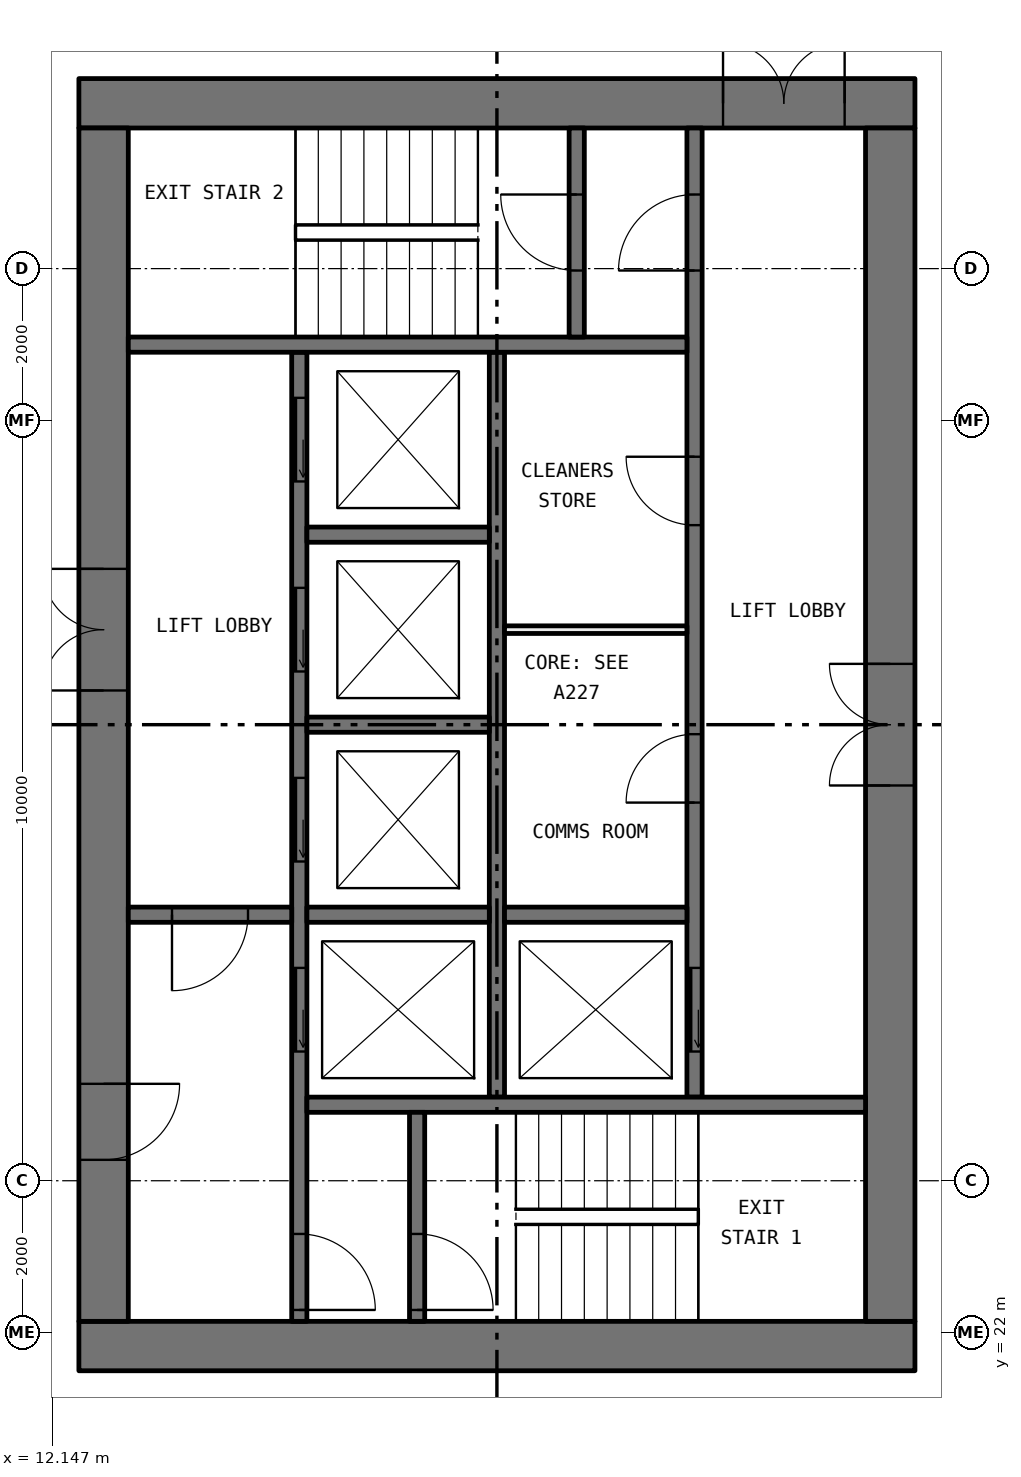
"""IFC4 building model, lengths in metres.
Left out: names, types, materials, properties, quantities, classifications, styles, units other than length and angle.
Written with IfcOpenShell. Run it as: python <this file> out.ifc"""

import sys

from ifc_helpers import new_model, si_unit, direction, frame, frame_2d, origin, place, context, subcontext, project, spatial, rectangle, extrude, element, fill, save


model = new_model("IFC4")
c1 = context("Model", 3, precision=1e-05, world=origin(), true_north=direction((0.0, 1.0)))
c2 = subcontext(c1, "Body", "Model", "MODEL_VIEW")
j1 = project(units=[si_unit("LENGTHUNIT", "METRE"), si_unit("PLANEANGLEUNIT", "RADIAN")], contexts=[c1])
p1 = place(None, origin())
s1 = spatial("IfcSite", under=j1, at=p1, CompositionType="ELEMENT")
p2 = place(p1, origin())
s2 = spatial("IfcBuilding", under=s1, at=p2, CompositionType="ELEMENT")
p3 = place(p2, frame((0.0, 0.0, 103.5)))
s3 = spatial("IfcBuildingStorey", under=s2, at=p3, CompositionType="ELEMENT", Elevation=103.5)
p4 = place(p3, frame((12.5, 21.825, 0.0), z_axis=(0.0, 0.0, 1.0), x_axis=(1.0, 0.0, 0.0)))
e1 = element("IfcWall", 1, at=p4, inside=s3, PredefinedType="SHEAR", context=c2, shape_type="SweptSolid", body=[
    extrude(rectangle(XDim=11.0, YDim=0.65, at=frame_2d((5.5, 0.0))), origin(), (0.0, 0.0, 1.0), 3.05),
])
p5 = place(p3, frame((12.5, 38.175, 0.0), z_axis=(0.0, 0.0, 1.0), x_axis=(1.0, 0.0, 0.0)))
e2 = element("IfcWall", 2, at=p5, inside=s3, PredefinedType="SHEAR", context=c2, shape_type="SweptSolid", body=[
    extrude(rectangle(XDim=11.0, YDim=0.65, at=frame_2d((5.5, 0.0))), origin(), (0.0, 0.0, 1.0), 3.05),
])
p6 = place(p5, frame((8.475, 0.0, 0.0)))
e3 = element("IfcOpeningElement", 3, at=p6, cuts=e2, PredefinedType="OPENING", context=c2, shape_type="SweptSolid", body=[
    extrude(rectangle(XDim=1.6, YDim=2.1, at=frame_2d((0.8, 1.05))), frame((0.0, 0.335, 0.0), z_axis=(0.0, -1.0, 0.0), x_axis=(1.0, 0.0, 0.0)), (0.0, 0.0, 1.0), 0.67),
])
p7 = place(p3, frame((12.825, 22.15, 0.0), z_axis=(0.0, 0.0, 1.0), x_axis=(0.0, 1.0, 0.0)))
e4 = element("IfcWall", 4, at=p7, inside=s3, PredefinedType="SHEAR", context=c2, shape_type="SweptSolid", body=[
    extrude(rectangle(XDim=15.7, YDim=0.65, at=frame_2d((7.85, 0.0))), origin(), (0.0, 0.0, 1.0), 3.05),
])
p8 = place(p7, frame((8.3, 0.0, 0.0)))
e5 = element("IfcOpeningElement", 5, at=p8, cuts=e4, PredefinedType="OPENING", context=c2, shape_type="SweptSolid", body=[
    extrude(rectangle(XDim=1.6, YDim=2.1, at=frame_2d((0.8, 1.05))), frame((0.0, 0.335, 0.0), z_axis=(0.0, -1.0, 0.0), x_axis=(1.0, 0.0, 0.0)), (0.0, 0.0, 1.0), 0.67),
])
p9 = place(p7, frame((2.125, 0.0, 0.0)))
e6 = element("IfcOpeningElement", 6, at=p9, cuts=e4, PredefinedType="OPENING", context=c2, shape_type="SweptSolid", body=[
    extrude(rectangle(XDim=1.0, YDim=2.1, at=frame_2d((0.5, 1.05))), frame((0.0, 0.335, 0.0), z_axis=(0.0, -1.0, 0.0), x_axis=(1.0, 0.0, 0.0)), (0.0, 0.0, 1.0), 0.67),
])
p10 = place(p3, frame((23.175, 22.15, 0.0), z_axis=(0.0, 0.0, 1.0), x_axis=(0.0, 1.0, 0.0)))
e7 = element("IfcWall", 7, at=p10, inside=s3, PredefinedType="SHEAR", context=c2, shape_type="SweptSolid", body=[
    extrude(rectangle(XDim=15.7, YDim=0.65, at=frame_2d((7.85, 0.0))), origin(), (0.0, 0.0, 1.0), 3.05),
])
p11 = place(p10, frame((7.05, 0.0, 0.0)))
e8 = element("IfcOpeningElement", 8, at=p11, cuts=e7, PredefinedType="OPENING", context=c2, shape_type="SweptSolid", body=[
    extrude(rectangle(XDim=1.6, YDim=2.1, at=frame_2d((0.8, 1.05))), frame((0.0, 0.335, 0.0), z_axis=(0.0, -1.0, 0.0), x_axis=(1.0, 0.0, 0.0)), (0.0, 0.0, 1.0), 0.67),
])
p12 = place(p3, frame((15.4, 22.15, 0.0), z_axis=(0.0, 0.0, 1.0), x_axis=(0.0, 1.0, 0.0)))
e9 = element("IfcWall", 9, at=p12, inside=s3, PredefinedType="SOLIDWALL", context=c2, shape_type="SweptSolid", body=[
    extrude(rectangle(XDim=12.75, YDim=0.2, at=frame_2d((6.375, 0.0))), origin(), (0.0, 0.0, 1.0), 3.05),
])
p13 = place(p12, frame((3.55, 0.0, 0.0)))
e10 = element("IfcOpeningElement", 10, at=p13, cuts=e9, PredefinedType="OPENING", context=c2, shape_type="SweptSolid", body=[
    extrude(rectangle(XDim=1.1, YDim=2.1, at=frame_2d((0.55, 1.05))), frame((0.0, 0.11, 0.0), z_axis=(0.0, -1.0, 0.0), x_axis=(1.0, 0.0, 0.0)), (0.0, 0.0, 1.0), 0.22),
])
p14 = place(p12, frame((6.05, 0.0, 0.0)))
e11 = element("IfcOpeningElement", 11, at=p14, cuts=e9, PredefinedType="OPENING", context=c2, shape_type="SweptSolid", body=[
    extrude(rectangle(XDim=1.1, YDim=2.1, at=frame_2d((0.55, 1.05))), frame((0.0, 0.11, 0.0), z_axis=(0.0, -1.0, 0.0), x_axis=(1.0, 0.0, 0.0)), (0.0, 0.0, 1.0), 0.22),
])
p15 = place(p12, frame((8.55, 0.0, 0.0)))
e12 = element("IfcOpeningElement", 12, at=p15, cuts=e9, PredefinedType="OPENING", context=c2, shape_type="SweptSolid", body=[
    extrude(rectangle(XDim=1.1, YDim=2.1, at=frame_2d((0.55, 1.05))), frame((0.0, 0.11, 0.0), z_axis=(0.0, -1.0, 0.0), x_axis=(1.0, 0.0, 0.0)), (0.0, 0.0, 1.0), 0.22),
])
p16 = place(p12, frame((11.05, 0.0, 0.0)))
e13 = element("IfcOpeningElement", 13, at=p16, cuts=e9, PredefinedType="OPENING", context=c2, shape_type="SweptSolid", body=[
    extrude(rectangle(XDim=1.1, YDim=2.1, at=frame_2d((0.55, 1.05))), frame((0.0, 0.11, 0.0), z_axis=(0.0, -1.0, 0.0), x_axis=(1.0, 0.0, 0.0)), (0.0, 0.0, 1.0), 0.22),
])
p17 = place(p12, frame((0.15, 0.0, 0.0)))
e14 = element("IfcOpeningElement", 14, at=p17, cuts=e9, PredefinedType="OPENING", context=c2, shape_type="SweptSolid", body=[
    extrude(rectangle(XDim=1.0, YDim=2.1, at=frame_2d((0.5, 1.05))), frame((0.0, 0.11, 0.0), z_axis=(0.0, -1.0, 0.0), x_axis=(1.0, 0.0, 0.0)), (0.0, 0.0, 1.0), 0.22),
])
p18 = place(p3, frame((20.6, 25.1, 0.0), z_axis=(0.0, 0.0, 1.0), x_axis=(0.0, 1.0, 0.0)))
e15 = element("IfcWall", 15, at=p18, inside=s3, PredefinedType="SOLIDWALL", context=c2, shape_type="SweptSolid", body=[
    extrude(rectangle(XDim=12.75, YDim=0.2, at=frame_2d((6.375, 0.0))), origin(), (0.0, 0.0, 1.0), 3.05),
])
p19 = place(p18, frame((0.6, 0.0, 0.0)))
e16 = element("IfcOpeningElement", 16, at=p19, cuts=e15, PredefinedType="OPENING", context=c2, shape_type="SweptSolid", body=[
    extrude(rectangle(XDim=1.1, YDim=2.1, at=frame_2d((0.55, 1.05))), frame((0.0, 0.11, 0.0), z_axis=(0.0, -1.0, 0.0), x_axis=(1.0, 0.0, 0.0)), (0.0, 0.0, 1.0), 0.22),
])
p20 = place(p18, frame((10.875, 0.0, 0.0)))
e17 = element("IfcOpeningElement", 17, at=p20, cuts=e15, PredefinedType="OPENING", context=c2, shape_type="SweptSolid", body=[
    extrude(rectangle(XDim=1.0, YDim=2.1, at=frame_2d((0.5, 1.05))), frame((0.0, 0.11, 0.0), z_axis=(0.0, -1.0, 0.0), x_axis=(1.0, 0.0, 0.0)), (0.0, 0.0, 1.0), 0.22),
])
p21 = place(p18, frame((3.875, 0.0, 0.0)))
e18 = element("IfcOpeningElement", 18, at=p21, cuts=e15, PredefinedType="OPENING", context=c2, shape_type="SweptSolid", body=[
    extrude(rectangle(XDim=0.9, YDim=2.1, at=frame_2d((0.45, 1.05))), frame((0.0, 0.11, 0.0), z_axis=(0.0, -1.0, 0.0), x_axis=(1.0, 0.0, 0.0)), (0.0, 0.0, 1.0), 0.22),
])
p22 = place(p18, frame((7.525, 0.0, 0.0)))
e19 = element("IfcOpeningElement", 19, at=p22, cuts=e15, PredefinedType="OPENING", context=c2, shape_type="SweptSolid", body=[
    extrude(rectangle(XDim=0.9, YDim=2.1, at=frame_2d((0.45, 1.05))), frame((0.0, 0.11, 0.0), z_axis=(0.0, -1.0, 0.0), x_axis=(1.0, 0.0, 0.0)), (0.0, 0.0, 1.0), 0.22),
])
p23 = place(p3, frame((18.0, 25.1, 0.0), z_axis=(0.0, 0.0, 1.0), x_axis=(0.0, 1.0, 0.0)))
e20 = element("IfcWall", 20, at=p23, inside=s3, PredefinedType="SOLIDWALL", context=c2, shape_type="SweptSolid", body=[
    extrude(rectangle(XDim=9.8, YDim=0.2, at=frame_2d((4.9, 0.0))), origin(), (0.0, 0.0, 1.0), 3.05),
])
for number, where, z_axis, x_axis in (
    (21, (15.5, 25.0, 0.0), (0.0, 0.0, 1.0), (1.0, 0.0, 0.0)),
    (22, (13.15, 35.0, 0.0), (0.0, 0.0, 1.0), (1.0, 0.0, 0.0)),
):
    element("IfcWall", number, at=place(p3, frame(where, z_axis=z_axis, x_axis=x_axis)), inside=s3, PredefinedType="SOLIDWALL", context=c2, shape_type="SweptSolid", body=[
        extrude(rectangle(XDim=7.35, YDim=0.2, at=frame_2d((3.675, 0.0))), origin(), (0.0, 0.0, 1.0), 3.05),
    ])
p24 = place(p3, frame((13.15, 27.5, 0.0), z_axis=(0.0, 0.0, 1.0), x_axis=(1.0, 0.0, 0.0)))
e23 = element("IfcWall", 23, at=p24, inside=s3, PredefinedType="SOLIDWALL", context=c2, shape_type="SweptSolid", body=[
    extrude(rectangle(XDim=2.15, YDim=0.2, at=frame_2d((1.075, 0.0))), origin(), (0.0, 0.0, 1.0), 3.05),
])
p25 = place(p24, frame((0.575, 0.0, 0.0)))
e24 = element("IfcOpeningElement", 24, at=p25, cuts=e23, PredefinedType="OPENING", context=c2, shape_type="SweptSolid", body=[
    extrude(rectangle(XDim=1.0, YDim=2.1, at=frame_2d((0.5, 1.05))), frame((0.0, 0.11, 0.0), z_axis=(0.0, -1.0, 0.0), x_axis=(1.0, 0.0, 0.0)), (0.0, 0.0, 1.0), 0.22),
])
p26 = place(p3, frame((16.95, 22.15, 0.0), z_axis=(0.0, 0.0, 1.0), x_axis=(0.0, 1.0, 0.0)))
e25 = element("IfcWall", 25, at=p26, inside=s3, PredefinedType="SOLIDWALL", context=c2, shape_type="SweptSolid", body=[
    extrude(rectangle(XDim=2.75, YDim=0.2, at=frame_2d((1.375, 0.0))), origin(), (0.0, 0.0, 1.0), 3.05),
])
p27 = place(p26, frame((0.15, 0.0, 0.0)))
e26 = element("IfcOpeningElement", 26, at=p27, cuts=e25, PredefinedType="OPENING", context=c2, shape_type="SweptSolid", body=[
    extrude(rectangle(XDim=1.0, YDim=2.1, at=frame_2d((0.5, 1.05))), frame((0.0, 0.11, 0.0), z_axis=(0.0, -1.0, 0.0), x_axis=(1.0, 0.0, 0.0)), (0.0, 0.0, 1.0), 0.22),
])
p28 = place(p3, frame((19.05, 35.1, 0.0), z_axis=(0.0, 0.0, 1.0), x_axis=(0.0, 1.0, 0.0)))
e27 = element("IfcWall", 27, at=p28, inside=s3, PredefinedType="SOLIDWALL", context=c2, shape_type="SweptSolid", body=[
    extrude(rectangle(XDim=2.75, YDim=0.2, at=frame_2d((1.375, 0.0))), origin(), (0.0, 0.0, 1.0), 3.05),
])
p29 = place(p28, frame((0.875, 0.0, 0.0)))
e28 = element("IfcOpeningElement", 28, at=p29, cuts=e27, PredefinedType="OPENING", context=c2, shape_type="SweptSolid", body=[
    extrude(rectangle(XDim=1.0, YDim=2.1, at=frame_2d((0.5, 1.05))), frame((0.0, 0.11, 0.0), z_axis=(0.0, -1.0, 0.0), x_axis=(1.0, 0.0, 0.0)), (0.0, 0.0, 1.0), 0.22),
])
for number, where, z_axis, x_axis in (
    (29, (15.5, 27.5, 0.0), (0.0, 0.0, 1.0), (1.0, 0.0, 0.0)),
    (30, (15.5, 30.0, 0.0), (0.0, 0.0, 1.0), (1.0, 0.0, 0.0)),
    (31, (15.5, 32.5, 0.0), (0.0, 0.0, 1.0), (1.0, 0.0, 0.0)),
    (32, (18.1, 27.5, 0.0), (0.0, 0.0, 1.0), (1.0, 0.0, 0.0)),
):
    element("IfcWall", number, at=place(p3, frame(where, z_axis=z_axis, x_axis=x_axis)), inside=s3, PredefinedType="SOLIDWALL", context=c2, shape_type="SweptSolid", body=[
        extrude(rectangle(XDim=2.4, YDim=0.2, at=frame_2d((1.2, 0.0))), origin(), (0.0, 0.0, 1.0), 3.05),
    ])
p30 = place(p3, frame((18.1, 31.25, 0.0), z_axis=(0.0, 0.0, 1.0), x_axis=(1.0, 0.0, 0.0)))
e33 = element("IfcWall", 33, at=p30, inside=s3, PredefinedType="PARTITIONING", context=c2, shape_type="SweptSolid", body=[
    extrude(rectangle(XDim=2.4, YDim=0.1, at=frame_2d((1.2, 0.0))), origin(), (0.0, 0.0, 1.0), 3.05),
])
p31 = place(p19, origin())
e34 = element("IfcDoor", 34, at=p31, inside=s3, OperationType="SLIDING_TO_LEFT", PredefinedType="DOOR", context=c2, shape_type="SweptSolid", body=[
    extrude(rectangle(XDim=1.1, YDim=2.1, at=frame_2d((0.55, 1.05))), frame((0.0, 0.025, 0.0), z_axis=(0.0, -1.0, 0.0), x_axis=(1.0, 0.0, 0.0)), (0.0, 0.0, 1.0), 0.05),
])
fill(e16, e34)
p32 = place(p13, origin())
e35 = element("IfcDoor", 35, at=p32, inside=s3, OperationType="SLIDING_TO_LEFT", PredefinedType="DOOR", context=c2, shape_type="SweptSolid", body=[
    extrude(rectangle(XDim=1.1, YDim=2.1, at=frame_2d((0.55, 1.05))), frame((0.0, 0.025, 0.0), z_axis=(0.0, -1.0, 0.0), x_axis=(1.0, 0.0, 0.0)), (0.0, 0.0, 1.0), 0.05),
])
fill(e10, e35)
p33 = place(p14, origin())
e36 = element("IfcDoor", 36, at=p33, inside=s3, OperationType="SLIDING_TO_LEFT", PredefinedType="DOOR", context=c2, shape_type="SweptSolid", body=[
    extrude(rectangle(XDim=1.1, YDim=2.1, at=frame_2d((0.55, 1.05))), frame((0.0, 0.025, 0.0), z_axis=(0.0, -1.0, 0.0), x_axis=(1.0, 0.0, 0.0)), (0.0, 0.0, 1.0), 0.05),
])
fill(e11, e36)
p34 = place(p15, origin())
e37 = element("IfcDoor", 37, at=p34, inside=s3, OperationType="SLIDING_TO_LEFT", PredefinedType="DOOR", context=c2, shape_type="SweptSolid", body=[
    extrude(rectangle(XDim=1.1, YDim=2.1, at=frame_2d((0.55, 1.05))), frame((0.0, 0.025, 0.0), z_axis=(0.0, -1.0, 0.0), x_axis=(1.0, 0.0, 0.0)), (0.0, 0.0, 1.0), 0.05),
])
fill(e12, e37)
p35 = place(p16, origin())
e38 = element("IfcDoor", 38, at=p35, inside=s3, OperationType="SLIDING_TO_LEFT", PredefinedType="DOOR", context=c2, shape_type="SweptSolid", body=[
    extrude(rectangle(XDim=1.1, YDim=2.1, at=frame_2d((0.55, 1.05))), frame((0.0, 0.025, 0.0), z_axis=(0.0, -1.0, 0.0), x_axis=(1.0, 0.0, 0.0)), (0.0, 0.0, 1.0), 0.05),
])
fill(e13, e38)
p36 = place(p27, frame((1.0, 0.0, 0.0), x_axis=(-1.0, 0.0, 0.0)))
e39 = element("IfcDoor", 39, at=p36, inside=s3, OperationType="SINGLE_SWING_LEFT", PredefinedType="DOOR", context=c2, shape_type="SweptSolid", body=[
    extrude(rectangle(XDim=1.0, YDim=2.1, at=frame_2d((0.5, 1.05))), frame((0.0, 0.025, 0.0), z_axis=(0.0, -1.0, 0.0), x_axis=(1.0, 0.0, 0.0)), (0.0, 0.0, 1.0), 0.05),
])
fill(e26, e39)
p37 = place(p17, frame((1.0, 0.0, 0.0), x_axis=(-1.0, 0.0, 0.0)))
e40 = element("IfcDoor", 40, at=p37, inside=s3, OperationType="SINGLE_SWING_LEFT", PredefinedType="DOOR", context=c2, shape_type="SweptSolid", body=[
    extrude(rectangle(XDim=1.0, YDim=2.1, at=frame_2d((0.5, 1.05))), frame((0.0, 0.025, 0.0), z_axis=(0.0, -1.0, 0.0), x_axis=(1.0, 0.0, 0.0)), (0.0, 0.0, 1.0), 0.05),
])
fill(e14, e40)
p38 = place(p20, origin())
e41 = element("IfcDoor", 41, at=p38, inside=s3, OperationType="SINGLE_SWING_RIGHT", PredefinedType="DOOR", context=c2, shape_type="SweptSolid", body=[
    extrude(rectangle(XDim=1.0, YDim=2.1, at=frame_2d((0.5, 1.05))), frame((0.0, 0.025, 0.0), z_axis=(0.0, -1.0, 0.0), x_axis=(1.0, 0.0, 0.0)), (0.0, 0.0, 1.0), 0.05),
])
fill(e17, e41)
p39 = place(p29, origin())
e42 = element("IfcDoor", 42, at=p39, inside=s3, OperationType="SINGLE_SWING_LEFT", PredefinedType="DOOR", context=c2, shape_type="SweptSolid", body=[
    extrude(rectangle(XDim=1.0, YDim=2.1, at=frame_2d((0.5, 1.05))), frame((0.0, 0.025, 0.0), z_axis=(0.0, -1.0, 0.0), x_axis=(1.0, 0.0, 0.0)), (0.0, 0.0, 1.0), 0.05),
])
fill(e28, e42)
p40 = place(p25, frame((1.0, 0.0, 0.0), x_axis=(-1.0, 0.0, 0.0)))
e43 = element("IfcDoor", 43, at=p40, inside=s3, OperationType="SINGLE_SWING_LEFT", PredefinedType="DOOR", context=c2, shape_type="SweptSolid", body=[
    extrude(rectangle(XDim=1.0, YDim=2.1, at=frame_2d((0.5, 1.05))), frame((0.0, 0.025, 0.0), z_axis=(0.0, -1.0, 0.0), x_axis=(1.0, 0.0, 0.0)), (0.0, 0.0, 1.0), 0.05),
])
fill(e24, e43)
p41 = place(p8, origin())
e44 = element("IfcDoor", 44, at=p41, inside=s3, OperationType="DOUBLE_DOOR_SINGLE_SWING", PredefinedType="DOOR", context=c2, shape_type="SweptSolid", body=[
    extrude(rectangle(XDim=1.6, YDim=2.1, at=frame_2d((0.8, 1.05))), frame((0.0, 0.025, 0.0), z_axis=(0.0, -1.0, 0.0), x_axis=(1.0, 0.0, 0.0)), (0.0, 0.0, 1.0), 0.05),
])
fill(e5, e44)
p42 = place(p9, frame((1.0, 0.0, 0.0), x_axis=(-1.0, 0.0, 0.0)))
e45 = element("IfcDoor", 45, at=p42, inside=s3, OperationType="SINGLE_SWING_RIGHT", PredefinedType="DOOR", context=c2, shape_type="SweptSolid", body=[
    extrude(rectangle(XDim=1.0, YDim=2.1, at=frame_2d((0.5, 1.05))), frame((0.0, 0.025, 0.0), z_axis=(0.0, -1.0, 0.0), x_axis=(1.0, 0.0, 0.0)), (0.0, 0.0, 1.0), 0.05),
])
fill(e6, e45)
p43 = place(p6, origin())
e46 = element("IfcDoor", 46, at=p43, inside=s3, OperationType="DOUBLE_DOOR_SINGLE_SWING", PredefinedType="DOOR", context=c2, shape_type="SweptSolid", body=[
    extrude(rectangle(XDim=1.6, YDim=2.1, at=frame_2d((0.8, 1.05))), frame((0.0, 0.025, 0.0), z_axis=(0.0, -1.0, 0.0), x_axis=(1.0, 0.0, 0.0)), (0.0, 0.0, 1.0), 0.05),
])
fill(e3, e46)
p44 = place(p11, origin())
e47 = element("IfcDoor", 47, at=p44, inside=s3, OperationType="DOUBLE_DOOR_SINGLE_SWING", PredefinedType="DOOR", context=c2, shape_type="SweptSolid", body=[
    extrude(rectangle(XDim=1.6, YDim=2.1, at=frame_2d((0.8, 1.05))), frame((0.0, 0.025, 0.0), z_axis=(0.0, -1.0, 0.0), x_axis=(1.0, 0.0, 0.0)), (0.0, 0.0, 1.0), 0.05),
])
fill(e8, e47)
p45 = place(p21, origin())
e48 = element("IfcDoor", 48, at=p45, inside=s3, OperationType="SINGLE_SWING_RIGHT", PredefinedType="DOOR", context=c2, shape_type="SweptSolid", body=[
    extrude(rectangle(XDim=0.9, YDim=2.1, at=frame_2d((0.45, 1.05))), frame((0.0, 0.025, 0.0), z_axis=(0.0, -1.0, 0.0), x_axis=(1.0, 0.0, 0.0)), (0.0, 0.0, 1.0), 0.05),
])
fill(e18, e48)
p46 = place(p22, origin())
e49 = element("IfcDoor", 49, at=p46, inside=s3, OperationType="SINGLE_SWING_LEFT", PredefinedType="DOOR", context=c2, shape_type="SweptSolid", body=[
    extrude(rectangle(XDim=0.9, YDim=2.1, at=frame_2d((0.45, 1.05))), frame((0.0, 0.025, 0.0), z_axis=(0.0, -1.0, 0.0), x_axis=(1.0, 0.0, 0.0)), (0.0, 0.0, 1.0), 0.05),
])
fill(e19, e49)
save(model, sys.argv[1])
